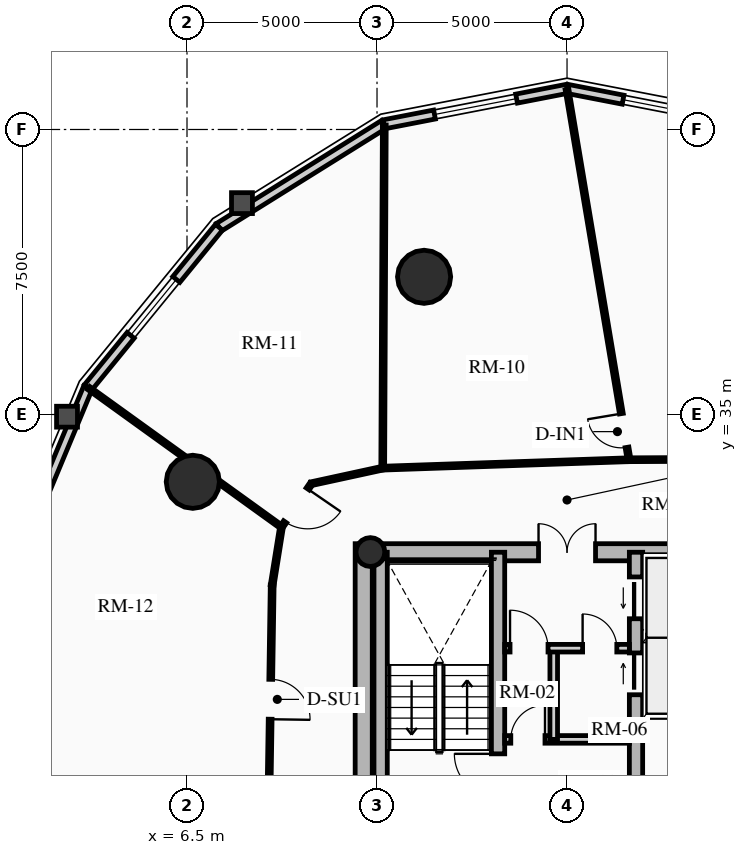
"""IFC4 building model, lengths in metres.
Left out: names, types, materials, properties, quantities, classifications, styles, units other than length and angle.
Written with IfcOpenShell. Run it as: python <this file> out.ifc"""

import sys

from ifc_helpers import new_model, si_unit, direction, frame, frame_2d, origin, origin_2d, place, context, subcontext, project, spatial, rectangle, circle, hollow_circle, extrude, source, transform, mapped, element, fill, save


model = new_model("IFC4")
c1 = context("Model", 3, precision=1e-05, world=origin(), true_north=direction((0.0, 1.0)))
c2 = subcontext(c1, "Body", "Model", "MODEL_VIEW")
j1 = project(units=[si_unit("LENGTHUNIT", "METRE"), si_unit("PLANEANGLEUNIT", "RADIAN")], contexts=[c1])
p1 = place(None, origin())
s1 = spatial("IfcSite", under=j1, at=p1, CompositionType="ELEMENT")
p2 = place(p1, origin())
s2 = spatial("IfcBuilding", under=s1, at=p2, CompositionType="ELEMENT")
p3 = place(p2, frame((0.0, 0.0, 99.25)))
s3 = spatial("IfcBuildingStorey", under=s2, at=p3, CompositionType="ELEMENT", Elevation=99.25)
p4 = place(p3, frame((11.15, 17.4, 0.0), z_axis=(0.0, 0.0, 1.0), x_axis=(0.0, 1.0, 0.0)))
e1 = element("IfcWall", 1, at=p4, inside=s3, PredefinedType="SHEAR", context=c2, shape_type="SweptSolid", body=[
    extrude(rectangle(XDim=14.2, YDim=0.45, at=frame_2d((7.1, 0.0))), origin(), (0.0, 0.0, 1.0), 2.91),
])
p5 = place(p3, frame((11.15, 31.375, 0.0), z_axis=(0.0, 0.0, 1.0), x_axis=(1.0, 0.0, 0.0)))
e2 = element("IfcWall", 2, at=p5, inside=s3, PredefinedType="SHEAR", context=c2, shape_type="SweptSolid", body=[
    extrude(rectangle(XDim=10.7, YDim=0.45, at=frame_2d((5.35, 0.0))), origin(), (0.0, 0.0, 1.0), 2.91),
])
m1 = source(origin(), c2, "Body", "SweptSolid", [
    extrude(rectangle(XDim=1.5, YDim=2.02, at=frame_2d((0.75, 1.01))), frame((0.0, 0.235, 0.0), z_axis=(0.0, -1.0, 0.0), x_axis=(1.0, 0.0, 0.0)), (0.0, 0.0, 1.0), 0.47),
])
p6 = place(p5, frame((4.6, 0.0, 0.0)))
e3 = element("IfcOpeningElement", 3, at=p6, cuts=e2, PredefinedType="OPENING", context=c2, shape_type="MappedRepresentation", body=[
    mapped(m1, transform((0.0, 0.0, 0.0), x_axis=(1.0, 0.0, 0.0), y_axis=(0.0, 1.0, 0.0), z_axis=(0.0, 0.0, 1.0), scale=1.0)),
])
p7 = place(p3, frame((14.685, 17.625, 0.0), z_axis=(0.0, 0.0, 1.0), x_axis=(0.0, 1.0, 0.0)))
e4 = element("IfcWall", 4, at=p7, inside=s3, PredefinedType="SHEAR", context=c2, shape_type="SweptSolid", body=[
    extrude(rectangle(XDim=13.75, YDim=0.35, at=frame_2d((6.875, 0.0))), origin(), (0.0, 0.0, 1.0), 2.91),
])
m2 = source(origin(), c2, "Body", "SweptSolid", [
    extrude(rectangle(XDim=1.1, YDim=2.015, at=frame_2d((0.55, 1.007))), frame((0.0, 0.185, 0.0), z_axis=(0.0, -1.0, 0.0), x_axis=(1.0, 0.0, 0.0)), (0.0, 0.0, 1.0), 0.37),
])
p8 = place(p7, frame((4.875, 0.0, 0.0)))
e5 = element("IfcOpeningElement", 5, at=p8, cuts=e4, PredefinedType="OPENING", context=c2, shape_type="MappedRepresentation", body=[
    mapped(m2, transform((0.0, 0.0, 0.0), x_axis=(1.0, 0.0, 0.0), y_axis=(0.0, 1.0, 0.0), z_axis=(0.0, 0.0, 1.0), scale=1.0)),
])
m3 = source(origin(), c2, "Body", "SweptSolid", [
    extrude(rectangle(XDim=1.15, YDim=2.02, at=frame_2d((0.575, 1.01))), frame((0.0, 0.185, 0.0), z_axis=(0.0, -1.0, 0.0), x_axis=(1.0, 0.0, 0.0)), (0.0, 0.0, 1.0), 0.37),
])
p9 = place(p7, frame((7.295, 0.0, 0.0)))
e6 = element("IfcOpeningElement", 6, at=p9, cuts=e4, PredefinedType="OPENING", context=c2, shape_type="MappedRepresentation", body=[
    mapped(m3, transform((0.0, 0.0, 0.0), x_axis=(1.0, 0.0, 0.0), y_axis=(0.0, 1.0, 0.0), z_axis=(0.0, 0.0, 1.0), scale=1.0)),
])
p10 = place(p3, frame((18.315, 17.625, 0.0), z_axis=(0.0, 0.0, 1.0), x_axis=(0.0, 1.0, 0.0)))
e7 = element("IfcWall", 7, at=p10, inside=s3, PredefinedType="SHEAR", context=c2, shape_type="SweptSolid", body=[
    extrude(rectangle(XDim=13.75, YDim=0.35, at=frame_2d((6.875, 0.0))), origin(), (0.0, 0.0, 1.0), 2.91),
])
p11 = place(p10, frame((10.0, 0.0, 0.0)))
e8 = element("IfcOpeningElement", 8, at=p11, cuts=e7, PredefinedType="OPENING", context=c2, shape_type="MappedRepresentation", body=[
    mapped(m2, transform((0.0, 0.0, 0.0), x_axis=(1.0, 0.0, 0.0), y_axis=(0.0, 1.0, 0.0), z_axis=(0.0, 0.0, 1.0), scale=1.0)),
])
p12 = place(p10, frame((12.0, 0.0, 0.0)))
e9 = element("IfcOpeningElement", 9, at=p12, cuts=e7, PredefinedType="OPENING", context=c2, shape_type="MappedRepresentation", body=[
    mapped(m2, transform((0.0, 0.0, 0.0), x_axis=(1.0, 0.0, 0.0), y_axis=(0.0, 1.0, 0.0), z_axis=(0.0, 0.0, 1.0), scale=1.0)),
])
p13 = place(p10, frame((5.305, 0.0, 0.0)))
e10 = element("IfcOpeningElement", 10, at=p13, cuts=e7, PredefinedType="OPENING", context=c2, shape_type="MappedRepresentation", body=[
    mapped(m3, transform((0.0, 0.0, 0.0), x_axis=(1.0, 0.0, 0.0), y_axis=(0.0, 1.0, 0.0), z_axis=(0.0, 0.0, 1.0), scale=1.0)),
])
p14 = place(p3, frame((11.595, 24.655, 0.0), z_axis=(0.0, 0.0, 1.0), x_axis=(0.0, 1.0, 0.0)))
e11 = element("IfcWall", 11, at=p14, inside=s3, PredefinedType="SHEAR", context=c2, shape_type="SweptSolid", body=[
    extrude(rectangle(XDim=6.72, YDim=0.35, at=frame_2d((3.36, 0.0))), origin(), (0.0, 0.0, 1.0), 2.91),
])
p15 = place(p3, frame((11.325, 31.38, 0.0), z_axis=(0.0, 0.0, 1.0), x_axis=(1.0, 0.0, 0.0)))
e12 = element("IfcColumn", 12, at=p15, inside=s3, PredefinedType="COLUMN", context=c2, shape_type="SweptSolid", body=[
    extrude(hollow_circle(Radius=0.38, WallThickness=0.032, at=origin_2d()), origin(), (0.0, 0.0, 1.0), 2.91),
])
for number, where, z_axis, x_axis in (
    (13, (12.739, 38.623, 0.0), (0.0, 0.0, 1.0), (1.0, 0.0, 0.0)),
    (14, (6.653, 33.229, 0.0), (0.0, 0.0, 1.0), (1.0, 0.0, 0.0)),
):
    element("IfcColumn", number, at=place(p3, frame(where, z_axis=z_axis, x_axis=x_axis)), inside=s3, PredefinedType="USERDEFINED", context=c2, shape_type="SweptSolid", body=[
        extrude(circle(Radius=0.7, at=origin_2d()), origin(), (0.0, 0.0, 1.0), 2.91),
    ])
p16 = place(p3, frame((16.5, 43.57, 0.0), z_axis=(0.0, 0.0, 1.0), x_axis=(0.981723785992, -0.190311344954, 0.0)))
e15 = element("IfcWall", 15, at=p16, inside=s3, PredefinedType="SOLIDWALL", context=c2, shape_type="SweptSolid", body=[
    extrude(rectangle(XDim=4.904, YDim=0.24, at=frame_2d((2.452, 0.0))), origin(), (0.0, 0.0, 1.0), 2.179),
])
m4 = source(origin(), c2, "Body", "SweptSolid", [
    extrude(rectangle(XDim=1.9, YDim=1.35, at=frame_2d((0.95, 0.675))), frame((0.0, 0.13, 0.0), z_axis=(0.0, -1.0, 0.0), x_axis=(1.0, 0.0, 0.0)), (0.0, 0.0, 1.0), 0.26),
])
p17 = place(p16, frame((1.502, 0.0, 0.65)))
e16 = element("IfcOpeningElement", 16, at=p17, cuts=e15, PredefinedType="OPENING", context=c2, shape_type="MappedRepresentation", body=[
    mapped(m4, transform((0.0, 0.0, 0.0), x_axis=(1.0, 0.0, 0.0), y_axis=(0.0, 1.0, 0.0), z_axis=(0.0, 0.0, 1.0), scale=1.0)),
])
p18 = place(p3, frame((11.685, 42.637, 0.0), z_axis=(0.0, 0.0, 1.0), x_axis=(0.981723785992, 0.190311344954, 0.0)))
e17 = element("IfcWall", 17, at=p18, inside=s3, PredefinedType="SOLIDWALL", context=c2, shape_type="SweptSolid", body=[
    extrude(rectangle(XDim=4.904, YDim=0.24, at=frame_2d((2.452, 0.0))), origin(), (0.0, 0.0, 1.0), 2.179),
])
m5 = source(origin(), c2, "Body", "SweptSolid", [
    extrude(rectangle(XDim=2.2, YDim=1.35, at=frame_2d((1.1, 0.675))), frame((0.0, 0.13, 0.0), z_axis=(0.0, -1.0, 0.0), x_axis=(1.0, 0.0, 0.0)), (0.0, 0.0, 1.0), 0.26),
])
p19 = place(p18, frame((1.352, 0.0, 0.65)))
e18 = element("IfcOpeningElement", 18, at=p19, cuts=e17, PredefinedType="OPENING", context=c2, shape_type="MappedRepresentation", body=[
    mapped(m5, transform((0.0, 0.0, 0.0), x_axis=(1.0, 0.0, 0.0), y_axis=(0.0, 1.0, 0.0), z_axis=(0.0, 0.0, 1.0), scale=1.0)),
])
p20 = place(p3, frame((7.342, 39.928, 0.0), z_axis=(0.0, 0.0, 1.0), x_axis=(0.848520380187, 0.529162701263, 0.0)))
e19 = element("IfcWall", 19, at=p20, inside=s3, PredefinedType="SOLIDWALL", context=c2, shape_type="SweptSolid", body=[
    extrude(rectangle(XDim=5.119, YDim=0.24, at=frame_2d((2.56, 0.0))), origin(), (0.0, 0.0, 1.0), 2.179),
])
p21 = place(p3, frame((3.895, 35.709, 0.0), z_axis=(0.0, 0.0, 1.0), x_axis=(0.632700781152, 0.77439635945, 0.0)))
e20 = element("IfcWall", 20, at=p21, inside=s3, PredefinedType="SOLIDWALL", context=c2, shape_type="SweptSolid", body=[
    extrude(rectangle(XDim=5.448, YDim=0.24, at=frame_2d((2.724, 0.0))), origin(), (0.0, 0.0, 1.0), 2.179),
])
p22 = place(p21, frame((1.774, 0.0, 0.65)))
e21 = element("IfcOpeningElement", 21, at=p22, cuts=e20, PredefinedType="OPENING", context=c2, shape_type="MappedRepresentation", body=[
    mapped(m4, transform((0.0, 0.0, 0.0), x_axis=(1.0, 0.0, 0.0), y_axis=(0.0, 1.0, 0.0), z_axis=(0.0, 0.0, 1.0), scale=1.0)),
])
p23 = place(p3, frame((1.682, 30.393, 0.0), z_axis=(0.0, 0.0, 1.0), x_axis=(0.384344417632, 0.923189779317, 0.0)))
e22 = element("IfcWall", 22, at=p23, inside=s3, PredefinedType="SOLIDWALL", context=c2, shape_type="SweptSolid", body=[
    extrude(rectangle(XDim=5.758, YDim=0.24, at=frame_2d((2.879, 0.0))), origin(), (0.0, 0.0, 1.0), 2.179),
])
for number, where, z_axis, x_axis in (
    (23, (18.51, 27.13, 0.0), (0.0, 0.0, 1.0), (1.0, 0.0, 0.0)),
    (24, (18.51, 29.175, 0.0), (0.0, 0.0, 1.0), (1.0, 0.0, 0.0)),
):
    element("IfcWall", number, at=place(p3, frame(where, z_axis=z_axis, x_axis=x_axis)), inside=s3, PredefinedType="SHEAR", context=c2, shape_type="SweptSolid", body=[
        extrude(rectangle(XDim=2.97, YDim=0.2, at=frame_2d((1.485, 0.0))), origin(), (0.0, 0.0, 1.0), 2.91),
    ])
p24 = place(p3, frame((14.86, 26.45, 0.0), z_axis=(0.0, 0.0, 1.0), x_axis=(1.0, 0.0, 0.0)))
e25 = element("IfcWall", 25, at=p24, inside=s3, PredefinedType="PARTITIONING", context=c2, shape_type="SweptSolid", body=[
    extrude(rectangle(XDim=3.28, YDim=0.2, at=frame_2d((1.64, 0.0))), origin(), (0.0, 0.0, 1.0), 2.655),
])
m6 = source(origin(), c2, "Body", "SweptSolid", [
    extrude(rectangle(XDim=0.9, YDim=2.005, at=frame_2d((0.45, 1.002))), frame((0.0, 0.11, 0.0), z_axis=(0.0, -1.0, 0.0), x_axis=(1.0, 0.0, 0.0)), (0.0, 0.0, 1.0), 0.22),
])
p25 = place(p24, frame((0.16, 0.0, 0.0)))
e26 = element("IfcOpeningElement", 26, at=p25, cuts=e25, PredefinedType="OPENING", context=c2, shape_type="MappedRepresentation", body=[
    mapped(m6, transform((0.0, 0.0, 0.0), x_axis=(1.0, 0.0, 0.0), y_axis=(0.0, 1.0, 0.0), z_axis=(0.0, 0.0, 1.0), scale=1.0)),
])
p26 = place(p3, frame((16.15, 26.45, 0.0), z_axis=(0.0, 0.0, 1.0), x_axis=(0.0, 1.0, 0.0)))
e27 = element("IfcWall", 27, at=p26, inside=s3, PredefinedType="PARTITIONING", context=c2, shape_type="SweptSolid", body=[
    extrude(rectangle(XDim=2.4, YDim=0.2, at=frame_2d((1.2, 0.0))), origin(), (0.0, 0.0, 1.0), 2.655),
])
p27 = place(p3, frame((14.86, 28.85, 0.0), z_axis=(0.0, 0.0, 1.0), x_axis=(1.0, 0.0, 0.0)))
e28 = element("IfcWall", 28, at=p27, inside=s3, PredefinedType="PARTITIONING", context=c2, shape_type="SweptSolid", body=[
    extrude(rectangle(XDim=3.28, YDim=0.2, at=frame_2d((1.64, 0.0))), origin(), (0.0, 0.0, 1.0), 2.655),
])
m7 = source(origin(), c2, "Body", "SweptSolid", [
    extrude(rectangle(XDim=1.0, YDim=2.015, at=frame_2d((0.5, 1.007))), frame((0.0, 0.11, 0.0), z_axis=(0.0, -1.0, 0.0), x_axis=(1.0, 0.0, 0.0)), (0.0, 0.0, 1.0), 0.22),
])
p28 = place(p27, frame((0.14, 0.0, 0.0)))
e29 = element("IfcOpeningElement", 29, at=p28, cuts=e28, PredefinedType="OPENING", context=c2, shape_type="MappedRepresentation", body=[
    mapped(m7, transform((0.0, 0.0, 0.0), x_axis=(1.0, 0.0, 0.0), y_axis=(0.0, 1.0, 0.0), z_axis=(0.0, 0.0, 1.0), scale=1.0)),
])
p29 = place(p27, frame((2.05, 0.0, 0.0)))
e30 = element("IfcOpeningElement", 30, at=p29, cuts=e28, PredefinedType="OPENING", context=c2, shape_type="MappedRepresentation", body=[
    mapped(m6, transform((0.0, 0.0, 0.0), x_axis=(1.0, 0.0, 0.0), y_axis=(0.0, 1.0, 0.0), z_axis=(0.0, 0.0, 1.0), scale=1.0)),
])
p30 = place(p3, frame((21.496, 33.824, 0.0), z_axis=(0.0, 0.0, 1.0), x_axis=(-0.999990516754, -0.004355043261, 0.0)))
e31 = element("IfcWall", 31, at=p30, inside=s3, PredefinedType="MOVABLE", context=c2, shape_type="SweptSolid", body=[
    extrude(rectangle(XDim=3.364, YDim=0.1, at=frame_2d((1.682, 0.0))), origin(), (0.0, 0.0, 1.0), 2.225),
])
p31 = place(p3, frame((18.133, 33.81, 0.0), z_axis=(0.0, 0.0, 1.0), x_axis=(-0.999415793323, -0.03417706916, 0.0)))
e32 = element("IfcWall", 32, at=p31, inside=s3, PredefinedType="MOVABLE", context=c2, shape_type="SweptSolid", body=[
    extrude(rectangle(XDim=6.486, YDim=0.1, at=frame_2d((3.243, 0.0))), origin(), (0.0, 0.0, 1.0), 2.225),
])
p32 = place(p3, frame((11.65, 33.588, 0.0), z_axis=(0.0, 0.0, 1.0), x_axis=(-0.977141987047, -0.212587716366, 0.0)))
e33 = element("IfcWall", 33, at=p32, inside=s3, PredefinedType="MOVABLE", context=c2, shape_type="SweptSolid", body=[
    extrude(rectangle(XDim=1.924, YDim=0.1, at=frame_2d((0.962, 0.0))), origin(), (0.0, 0.0, 1.0), 2.225),
])
p33 = place(p3, frame((9.771, 33.179, 0.0), z_axis=(0.0, 0.0, 1.0), x_axis=(-0.56664857412, -0.823959582412, 0.0)))
e34 = element("IfcWall", 34, at=p33, inside=s3, PredefinedType="MOVABLE", context=c2, shape_type="SweptSolid", body=[
    extrude(rectangle(XDim=1.384, YDim=0.1, at=frame_2d((0.692, 0.0))), origin(), (0.0, 0.0, 1.0), 2.225),
])
m8 = source(origin(), c2, "Body", "SweptSolid", [
    extrude(rectangle(XDim=1.05, YDim=2.015, at=frame_2d((0.525, 1.007))), frame((0.0, 0.06, 0.0), z_axis=(0.0, -1.0, 0.0), x_axis=(1.0, 0.0, 0.0)), (0.0, 0.0, 1.0), 0.12),
])
p34 = place(p33, frame((0.167, 0.0, 0.0)))
e35 = element("IfcOpeningElement", 35, at=p34, cuts=e34, PredefinedType="OPENING", context=c2, shape_type="MappedRepresentation", body=[
    mapped(m8, transform((0.0, 0.0, 0.0), x_axis=(1.0, 0.0, 0.0), y_axis=(0.0, 1.0, 0.0), z_axis=(0.0, 0.0, 1.0), scale=1.0)),
])
p35 = place(p3, frame((8.986, 32.038, 0.0), z_axis=(0.0, 0.0, 1.0), x_axis=(-0.158224526738, -0.987403159372, 0.0)))
e36 = element("IfcWall", 36, at=p35, inside=s3, PredefinedType="MOVABLE", context=c2, shape_type="SweptSolid", body=[
    extrude(rectangle(XDim=1.546, YDim=0.1, at=frame_2d((0.773, 0.0))), origin(), (0.0, 0.0, 1.0), 2.225),
])
p36 = place(p3, frame((8.742, 30.512, 0.0), z_axis=(0.0, 0.0, 1.0), x_axis=(-0.015267875777, -0.999883439191, 0.0)))
e37 = element("IfcWall", 37, at=p36, inside=s3, PredefinedType="MOVABLE", context=c2, shape_type="SweptSolid", body=[
    extrude(rectangle(XDim=6.012, YDim=0.1, at=frame_2d((3.006, 0.0))), origin(), (0.0, 0.0, 1.0), 2.655),
])
p37 = place(p36, frame((2.481, 0.0, 0.0)))
e38 = element("IfcOpeningElement", 38, at=p37, cuts=e37, PredefinedType="OPENING", context=c2, shape_type="MappedRepresentation", body=[
    mapped(m8, transform((0.0, 0.0, 0.0), x_axis=(1.0, 0.0, 0.0), y_axis=(0.0, 1.0, 0.0), z_axis=(0.0, 0.0, 1.0), scale=1.0)),
])
p38 = place(p3, frame((11.65, 33.588, 0.0), z_axis=(0.0, 0.0, 1.0), x_axis=(0.004542212376, 0.9999896841, 0.0)))
e39 = element("IfcWall", 39, at=p38, inside=s3, PredefinedType="MOVABLE", context=c2, shape_type="SweptSolid", body=[
    extrude(rectangle(XDim=9.03, YDim=0.1, at=frame_2d((4.515, 0.0))), origin(), (0.0, 0.0, 1.0), 2.179),
])
p39 = place(p3, frame((8.986, 32.038, 0.0), z_axis=(0.0, 0.0, 1.0), x_axis=(-0.811184127106, 0.584790827502, 0.0)))
e40 = element("IfcWall", 40, at=p39, inside=s3, PredefinedType="MOVABLE", context=c2, shape_type="SweptSolid", body=[
    extrude(rectangle(XDim=6.257, YDim=0.1, at=frame_2d((3.128, 0.0))), origin(), (0.0, 0.0, 1.0), 2.179),
])
p40 = place(p3, frame((18.133, 33.81, 0.0), z_axis=(0.0, 0.0, 1.0), x_axis=(-0.165324898919, 0.98623915852, 0.0)))
e41 = element("IfcWall", 41, at=p40, inside=s3, PredefinedType="MOVABLE", context=c2, shape_type="SweptSolid", body=[
    extrude(rectangle(XDim=9.876, YDim=0.1, at=frame_2d((4.938, 0.0))), origin(), (0.0, 0.0, 1.0), 2.179),
])
m9 = source(origin(), c2, "Body", "SweptSolid", [
    extrude(rectangle(XDim=0.9, YDim=2.005, at=frame_2d((0.45, 1.002))), frame((0.0, 0.06, 0.0), z_axis=(0.0, -1.0, 0.0), x_axis=(1.0, 0.0, 0.0)), (0.0, 0.0, 1.0), 0.12),
])
p41 = place(p40, frame((0.33, 0.0, 0.0)))
e42 = element("IfcOpeningElement", 42, at=p41, cuts=e41, PredefinedType="OPENING", context=c2, shape_type="MappedRepresentation", body=[
    mapped(m9, transform((0.0, 0.0, 0.0), x_axis=(1.0, 0.0, 0.0), y_axis=(0.0, 1.0, 0.0), z_axis=(0.0, 0.0, 1.0), scale=1.0)),
])
m10 = source(origin(), c2, "Body", "SweptSolid", [
    extrude(rectangle(XDim=1.9, YDim=1.35, at=frame_2d((0.95, 0.675))), frame((0.0, 0.03, 0.0), z_axis=(0.0, -1.0, 0.0), x_axis=(1.0, 0.0, 0.0)), (0.0, 0.0, 1.0), 0.06),
])
p42 = place(p17, origin())
e43 = element("IfcWindow", 43, at=p42, inside=s3, PartitioningType="DOUBLE_PANEL_VERTICAL", PredefinedType="WINDOW", context=c2, shape_type="MappedRepresentation", body=[
    mapped(m10, transform((0.0, 0.0, 0.0), x_axis=(1.0, 0.0, 0.0), y_axis=(0.0, 1.0, 0.0), z_axis=(0.0, 0.0, 1.0), scale=1.0)),
])
fill(e16, e43)
m11 = source(origin(), c2, "Body", "SweptSolid", [
    extrude(rectangle(XDim=2.2, YDim=1.35, at=frame_2d((1.1, 0.675))), frame((0.0, 0.03, 0.0), z_axis=(0.0, -1.0, 0.0), x_axis=(1.0, 0.0, 0.0)), (0.0, 0.0, 1.0), 0.06),
])
p43 = place(p19, origin())
e44 = element("IfcWindow", 44, at=p43, inside=s3, PartitioningType="DOUBLE_PANEL_VERTICAL", PredefinedType="WINDOW", context=c2, shape_type="MappedRepresentation", body=[
    mapped(m11, transform((0.0, 0.0, 0.0), x_axis=(1.0, 0.0, 0.0), y_axis=(0.0, 1.0, 0.0), z_axis=(0.0, 0.0, 1.0), scale=1.0)),
])
fill(e18, e44)
p44 = place(p22, origin())
e45 = element("IfcWindow", 45, at=p44, inside=s3, PartitioningType="DOUBLE_PANEL_VERTICAL", PredefinedType="WINDOW", context=c2, shape_type="MappedRepresentation", body=[
    mapped(m10, transform((0.0, 0.0, 0.0), x_axis=(1.0, 0.0, 0.0), y_axis=(0.0, 1.0, 0.0), z_axis=(0.0, 0.0, 1.0), scale=1.0)),
])
fill(e21, e45)
m12 = source(origin(), c2, "Body", "SweptSolid", [
    extrude(rectangle(XDim=1.1, YDim=2.015, at=frame_2d((0.55, 1.007))), frame((0.0, 0.025, 0.0), z_axis=(0.0, -1.0, 0.0), x_axis=(1.0, 0.0, 0.0)), (0.0, 0.0, 1.0), 0.05),
])
p45 = place(p11, origin())
e46 = element("IfcDoor", 46, at=p45, inside=s3, OperationType="SLIDING_TO_RIGHT", PredefinedType="DOOR", context=c2, shape_type="MappedRepresentation", body=[
    mapped(m12, transform((0.0, 0.0, 0.0), x_axis=(1.0, 0.0, 0.0), y_axis=(0.0, 1.0, 0.0), z_axis=(0.0, 0.0, 1.0), scale=1.0)),
])
fill(e8, e46)
p46 = place(p12, origin())
e47 = element("IfcDoor", 47, at=p46, inside=s3, OperationType="SLIDING_TO_LEFT", PredefinedType="DOOR", context=c2, shape_type="MappedRepresentation", body=[
    mapped(m12, transform((0.0, 0.0, 0.0), x_axis=(1.0, 0.0, 0.0), y_axis=(0.0, 1.0, 0.0), z_axis=(0.0, 0.0, 1.0), scale=1.0)),
])
fill(e9, e47)
m13 = source(origin(), c2, "Body", "SweptSolid", [
    extrude(rectangle(XDim=1.15, YDim=2.02, at=frame_2d((0.575, 1.01))), frame((0.0, 0.025, 0.0), z_axis=(0.0, -1.0, 0.0), x_axis=(1.0, 0.0, 0.0)), (0.0, 0.0, 1.0), 0.05),
])
p47 = place(p9, origin())
e48 = element("IfcDoor", 48, at=p47, inside=s3, OperationType="SINGLE_SWING_RIGHT", PredefinedType="DOOR", context=c2, shape_type="MappedRepresentation", body=[
    mapped(m13, transform((0.0, 0.0, 0.0), x_axis=(1.0, 0.0, 0.0), y_axis=(0.0, 1.0, 0.0), z_axis=(0.0, 0.0, 1.0), scale=1.0)),
])
fill(e6, e48)
m14 = source(origin(), c2, "Body", "SweptSolid", [
    extrude(rectangle(XDim=1.5, YDim=2.02, at=frame_2d((0.75, 1.01))), frame((0.0, 0.025, 0.0), z_axis=(0.0, -1.0, 0.0), x_axis=(1.0, 0.0, 0.0)), (0.0, 0.0, 1.0), 0.05),
])
p48 = place(p6, origin())
e49 = element("IfcDoor", 49, at=p48, inside=s3, OperationType="DOUBLE_DOOR_SINGLE_SWING", PredefinedType="DOOR", context=c2, shape_type="MappedRepresentation", body=[
    mapped(m14, transform((0.0, 0.0, 0.0), x_axis=(1.0, 0.0, 0.0), y_axis=(0.0, 1.0, 0.0), z_axis=(0.0, 0.0, 1.0), scale=1.0)),
])
fill(e3, e49)
m15 = source(origin(), c2, "Body", "SweptSolid", [
    extrude(rectangle(XDim=0.9, YDim=2.005, at=frame_2d((0.45, 1.002))), frame((0.0, 0.025, 0.0), z_axis=(0.0, -1.0, 0.0), x_axis=(1.0, 0.0, 0.0)), (0.0, 0.0, 1.0), 0.05),
])
p49 = place(p25, origin())
e50 = element("IfcDoor", 50, at=p49, inside=s3, OperationType="SINGLE_SWING_RIGHT", PredefinedType="DOOR", context=c2, shape_type="MappedRepresentation", body=[
    mapped(m15, transform((0.0, 0.0, 0.0), x_axis=(1.0, 0.0, 0.0), y_axis=(0.0, 1.0, 0.0), z_axis=(0.0, 0.0, 1.0), scale=1.0)),
])
fill(e26, e50)
m16 = source(origin(), c2, "Body", "SweptSolid", [
    extrude(rectangle(XDim=1.0, YDim=2.015, at=frame_2d((0.5, 1.007))), frame((0.0, 0.025, 0.0), z_axis=(0.0, -1.0, 0.0), x_axis=(1.0, 0.0, 0.0)), (0.0, 0.0, 1.0), 0.05),
])
p50 = place(p28, origin())
e51 = element("IfcDoor", 51, at=p50, inside=s3, OperationType="SINGLE_SWING_LEFT", PredefinedType="DOOR", context=c2, shape_type="MappedRepresentation", body=[
    mapped(m16, transform((0.0, 0.0, 0.0), x_axis=(1.0, 0.0, 0.0), y_axis=(0.0, 1.0, 0.0), z_axis=(0.0, 0.0, 1.0), scale=1.0)),
])
fill(e29, e51)
p51 = place(p29, origin())
e52 = element("IfcDoor", 52, at=p51, inside=s3, OperationType="SINGLE_SWING_LEFT", PredefinedType="DOOR", context=c2, shape_type="MappedRepresentation", body=[
    mapped(m15, transform((0.0, 0.0, 0.0), x_axis=(1.0, 0.0, 0.0), y_axis=(0.0, 1.0, 0.0), z_axis=(0.0, 0.0, 1.0), scale=1.0)),
])
fill(e30, e52)
p52 = place(p41, origin())
e53 = element("IfcDoor", 53, at=p52, inside=s3, OperationType="SINGLE_SWING_RIGHT", PredefinedType="DOOR", context=c2, shape_type="MappedRepresentation", body=[
    mapped(m15, transform((0.0, 0.0, 0.0), x_axis=(1.0, 0.0, 0.0), y_axis=(0.0, 1.0, 0.0), z_axis=(0.0, 0.0, 1.0), scale=1.0)),
])
fill(e42, e53)
m17 = source(origin(), c2, "Body", "SweptSolid", [
    extrude(rectangle(XDim=1.05, YDim=2.015, at=frame_2d((0.525, 1.007))), frame((0.0, 0.025, 0.0), z_axis=(0.0, -1.0, 0.0), x_axis=(1.0, 0.0, 0.0)), (0.0, 0.0, 1.0), 0.05),
])
p53 = place(p34, origin())
e54 = element("IfcDoor", 54, at=p53, inside=s3, OperationType="SINGLE_SWING_LEFT", PredefinedType="DOOR", context=c2, shape_type="MappedRepresentation", body=[
    mapped(m17, transform((0.0, 0.0, 0.0), x_axis=(1.0, 0.0, 0.0), y_axis=(0.0, 1.0, 0.0), z_axis=(0.0, 0.0, 1.0), scale=1.0)),
])
fill(e35, e54)
p54 = place(p37, origin())
e55 = element("IfcDoor", 55, at=p54, inside=s3, OperationType="SINGLE_SWING_RIGHT", PredefinedType="DOOR", context=c2, shape_type="MappedRepresentation", body=[
    mapped(m17, transform((0.0, 0.0, 0.0), x_axis=(1.0, 0.0, 0.0), y_axis=(0.0, 1.0, 0.0), z_axis=(0.0, 0.0, 1.0), scale=1.0)),
])
fill(e38, e55)
save(model, sys.argv[1])
